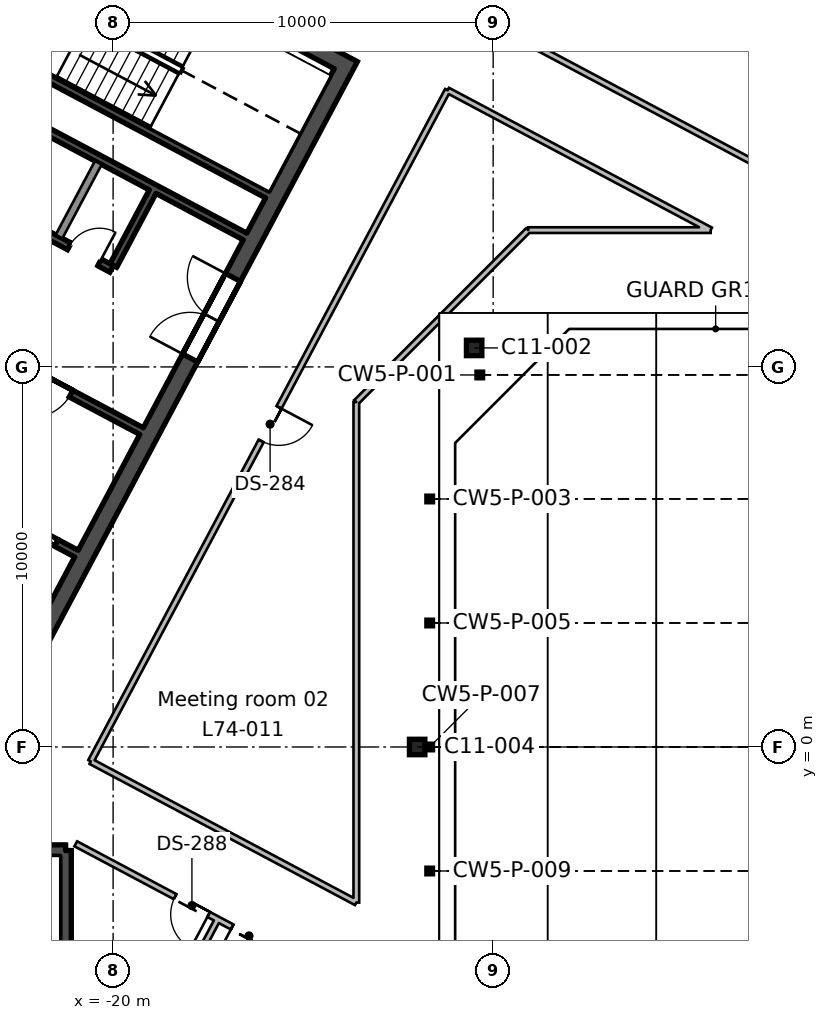
"""IFC4 building model, lengths in metres.
Left out: names, types, materials, properties, quantities, classifications, styles, units other than length and angle.
Written with IfcOpenShell. Run it as: python <this file> out.ifc"""

import sys

from ifc_helpers import new_model, si_unit, direction, frame, frame_2d, origin, origin_2d, place, context, subcontext, project, spatial, rectangle, hollow_rectangle, extrude, element, fill, save


model = new_model("IFC4")
c1 = context("Model", 3, precision=1e-05, world=origin(), true_north=direction((0.0, 1.0)))
c2 = subcontext(c1, "Body", "Model", "MODEL_VIEW")
j1 = project(units=[si_unit("LENGTHUNIT", "METRE"), si_unit("PLANEANGLEUNIT", "RADIAN")], contexts=[c1])
p1 = place(None, origin())
s1 = spatial("IfcSite", under=j1, at=p1, CompositionType="ELEMENT")
p2 = place(p1, origin())
s2 = spatial("IfcBuilding", under=s1, at=p2, CompositionType="ELEMENT")
p3 = place(p2, frame((0.0, 0.0, 324.3)))
s3 = spatial("IfcBuildingStorey", under=s2, at=p3, CompositionType="ELEMENT", Elevation=324.3)
for number, where, z_axis, x_axis in (
    (1, (-12.0, 0.0, 0.0), (0.0, 0.0, 1.0), (1.0, 0.0, 0.0)),
    (2, (-10.5, 10.5, 0.0), (0.0, 0.0, 1.0), (1.0, 0.0, 0.0)),
):
    element("IfcColumn", number, at=place(p3, frame(where, z_axis=z_axis, x_axis=x_axis)), inside=s3, PredefinedType="COLUMN", context=c2, shape_type="SweptSolid", body=[
        extrude(hollow_rectangle(XDim=0.406, YDim=0.406, WallThickness=0.009, InnerFilletRadius=0.004, OuterFilletRadius=0.013, at=origin_2d()), origin(), (0.0, 0.0, 1.0), 3.9),
    ])
p4 = place(p3, frame((-13.771, 18.138, 0.0), z_axis=(0.0, 0.0, 1.0), x_axis=(-0.469467968382, -0.882949504028, 0.0)))
e3 = element("IfcWall", 3, at=p4, inside=s3, PredefinedType="SHEAR", context=c2, shape_type="SweptSolid", body=[
    extrude(rectangle(XDim=19.1, YDim=0.45, at=frame_2d((9.55, 0.0))), origin(), (0.0, 0.0, 1.0), 3.9),
])
p5 = place(p4, frame((6.55, 0.0, 0.0)))
e4 = element("IfcOpeningElement", 4, at=p5, cuts=e3, PredefinedType="OPENING", context=c2, shape_type="SweptSolid", body=[
    extrude(rectangle(XDim=2.4, YDim=2.4, at=frame_2d((1.2, 1.2))), frame((0.0, 0.235, 0.0), z_axis=(0.0, -1.0, 0.0), x_axis=(1.0, 0.0, 0.0)), (0.0, 0.0, 1.0), 0.47),
])
p6 = place(p3, frame((-14.076, 18.045, 0.0), z_axis=(0.0, 0.0, 1.0), x_axis=(-0.882947755831, 0.46947125628, 0.0)))
e5 = element("IfcWall", 5, at=p6, inside=s3, PredefinedType="SHEAR", context=c2, shape_type="SweptSolid", body=[
    extrude(rectangle(XDim=20.2, YDim=0.45, at=frame_2d((10.1, 0.0))), origin(), (0.0, 0.0, 1.0), 3.9),
])
p7 = place(p3, frame((-18.96, 14.611, 0.0), z_axis=(0.0, 0.0, 1.0), x_axis=(-0.4694473164, -0.882960484464, 0.0)))
e6 = element("IfcWall", 6, at=p7, inside=s3, PredefinedType="SHEAR", context=c2, shape_type="SweptSolid", body=[
    extrude(rectangle(XDim=2.2, YDim=0.2, at=frame_2d((1.1, 0.0))), origin(), (0.0, 0.0, 1.0), 3.9),
])
p8 = place(p3, frame((-20.39, 15.372, 0.0), z_axis=(0.0, 0.0, 1.0), x_axis=(-0.4694473164, -0.882960484464, 0.0)))
e7 = element("IfcWall", 7, at=p8, inside=s3, PredefinedType="SOLIDWALL", context=c2, shape_type="SweptSolid", body=[
    extrude(rectangle(XDim=2.2, YDim=0.2, at=frame_2d((1.1, 0.0))), origin(), (0.0, 0.0, 1.0), 3.9),
])
p9 = place(p3, frame((-21.333, 21.649, 0.0), z_axis=(0.0, 0.0, 1.0), x_axis=(-0.469494272526, -0.882935517501, 0.0)))
e8 = element("IfcWall", 8, at=p9, inside=s3, PredefinedType="SHEAR", context=c2, shape_type="SweptSolid", body=[
    extrude(rectangle(XDim=7.3, YDim=0.2, at=frame_2d((3.65, 0.0))), origin(), (0.0, 0.0, 1.0), 3.9),
])
p10 = place(p9, frame((1.3, 0.0, 0.0)))
e9 = element("IfcOpeningElement", 9, at=p10, cuts=e8, PredefinedType="OPENING", context=c2, shape_type="SweptSolid", body=[
    extrude(rectangle(XDim=1.2, YDim=2.1, at=frame_2d((0.6, 1.05))), frame((0.0, 0.11, 0.0), z_axis=(0.0, -1.0, 0.0), x_axis=(1.0, 0.0, 0.0)), (0.0, 0.0, 1.0), 0.22),
])
p11 = place(p3, frame((-15.942, 14.536, 0.0), z_axis=(0.0, 0.0, 1.0), x_axis=(-0.882946947542, 0.469472776449, 0.0)))
e10 = element("IfcWall", 10, at=p11, inside=s3, PredefinedType="SHEAR", context=c2, shape_type="SweptSolid", body=[
    extrude(rectangle(XDim=8.0, YDim=0.2, at=frame_2d((4.0, 0.0))), origin(), (0.0, 0.0, 1.0), 3.9),
])
p12 = place(p3, frame((-16.529, 13.432, 0.0), z_axis=(0.0, 0.0, 1.0), x_axis=(-0.88295287151, 0.469461634952, 0.0)))
e11 = element("IfcWall", 11, at=p12, inside=s3, PredefinedType="SHEAR", context=c2, shape_type="SweptSolid", body=[
    extrude(rectangle(XDim=8.0, YDim=0.2, at=frame_2d((4.0, 0.0))), origin(), (0.0, 0.0, 1.0), 3.9),
])
p13 = place(p3, frame((-20.04, 12.581, 0.0), z_axis=(0.0, 0.0, 1.0), x_axis=(-0.882942972946, 0.469480251476, 0.0)))
e12 = element("IfcWall", 12, at=p13, inside=s3, PredefinedType="SHEAR", context=c2, shape_type="SweptSolid", body=[
    extrude(rectangle(XDim=5.4, YDim=0.2, at=frame_2d((2.7, 0.0))), origin(), (0.0, 0.0, 1.0), 3.9),
])
p14 = place(p13, frame((0.36, 0.0, 0.0)))
e13 = element("IfcOpeningElement", 13, at=p14, cuts=e12, PredefinedType="OPENING", context=c2, shape_type="SweptSolid", body=[
    extrude(rectangle(XDim=0.9, YDim=2.1, at=frame_2d((0.45, 1.05))), frame((0.0, 0.11, 0.0), z_axis=(0.0, -1.0, 0.0), x_axis=(1.0, 0.0, 0.0)), (0.0, 0.0, 1.0), 0.22),
])
p15 = place(p13, frame((3.06, 0.0, 0.0)))
e14 = element("IfcOpeningElement", 14, at=p15, cuts=e12, PredefinedType="OPENING", context=c2, shape_type="SweptSolid", body=[
    extrude(rectangle(XDim=0.9, YDim=2.1, at=frame_2d((0.45, 1.05))), frame((0.0, 0.11, 0.0), z_axis=(0.0, -1.0, 0.0), x_axis=(1.0, 0.0, 0.0)), (0.0, 0.0, 1.0), 0.22),
])
p16 = place(p3, frame((-19.252, 8.311, 0.0), z_axis=(0.0, 0.0, 1.0), x_axis=(-0.882955722218, 0.469456273365, 0.0)))
e15 = element("IfcWall", 15, at=p16, inside=s3, PredefinedType="SHEAR", context=c2, shape_type="SweptSolid", body=[
    extrude(rectangle(XDim=10.0, YDim=0.2, at=frame_2d((5.0, 0.0))), origin(), (0.0, 0.0, 1.0), 3.9),
])
p17 = place(p16, frame((2.1, 0.0, 0.0)))
e16 = element("IfcOpeningElement", 16, at=p17, cuts=e15, PredefinedType="OPENING", context=c2, shape_type="SweptSolid", body=[
    extrude(rectangle(XDim=1.2, YDim=2.1, at=frame_2d((0.6, 1.05))), frame((0.0, 0.11, 0.0), z_axis=(0.0, -1.0, 0.0), x_axis=(1.0, 0.0, 0.0)), (0.0, 0.0, 1.0), 0.22),
])
p18 = place(p16, frame((5.4, 0.0, 0.0)))
e17 = element("IfcOpeningElement", 17, at=p18, cuts=e15, PredefinedType="OPENING", context=c2, shape_type="SweptSolid", body=[
    extrude(rectangle(XDim=1.1, YDim=2.1, at=frame_2d((0.55, 1.05))), frame((0.0, 0.11, 0.0), z_axis=(0.0, -1.0, 0.0), x_axis=(1.0, 0.0, 0.0)), (0.0, 0.0, 1.0), 0.22),
])
p19 = place(p16, frame((8.1, 0.0, 0.0)))
e18 = element("IfcOpeningElement", 18, at=p19, cuts=e15, PredefinedType="OPENING", context=c2, shape_type="SweptSolid", body=[
    extrude(rectangle(XDim=1.1, YDim=2.1, at=frame_2d((0.55, 1.05))), frame((0.0, 0.11, 0.0), z_axis=(0.0, -1.0, 0.0), x_axis=(1.0, 0.0, 0.0)), (0.0, 0.0, 1.0), 0.22),
])
p20 = place(p3, frame((-20.965, 5.088, 0.0), z_axis=(0.0, 0.0, 1.0), x_axis=(-0.882925986334, 0.469512196493, 0.0)))
e19 = element("IfcWall", 19, at=p20, inside=s3, PredefinedType="SHEAR", context=c2, shape_type="SweptSolid", body=[
    extrude(rectangle(XDim=4.5, YDim=0.2, at=frame_2d((2.25, 0.0))), origin(), (0.0, 0.0, 1.0), 3.9),
])
p21 = place(p20, frame((0.6, 0.0, 0.0)))
e20 = element("IfcOpeningElement", 20, at=p21, cuts=e19, PredefinedType="OPENING", context=c2, shape_type="SweptSolid", body=[
    extrude(rectangle(XDim=1.1, YDim=2.1, at=frame_2d((0.55, 1.05))), frame((0.0, 0.11, 0.0), z_axis=(0.0, -1.0, 0.0), x_axis=(1.0, 0.0, 0.0)), (0.0, 0.0, 1.0), 0.22),
])
p22 = place(p3, frame((-21.25, -2.725, 0.0), z_axis=(0.0, 0.0, 1.0), x_axis=(0.0, -1.0, 0.0)))
e21 = element("IfcWall", 21, at=p22, inside=s3, PredefinedType="SHEAR", context=c2, shape_type="SweptSolid", body=[
    extrude(rectangle(XDim=3.75, YDim=0.3, at=frame_2d((1.875, 0.0))), origin(), (0.0, 0.0, 1.0), 3.9),
])
p23 = place(p3, frame((-29.55, -2.725, 0.0), z_axis=(0.0, 0.0, 1.0), x_axis=(1.0, 0.0, 0.0)))
e22 = element("IfcWall", 22, at=p23, inside=s3, PredefinedType="SHEAR", context=c2, shape_type="SweptSolid", body=[
    extrude(rectangle(XDim=8.3, YDim=0.3, at=frame_2d((4.15, 0.0))), origin(), (0.0, 0.0, 1.0), 3.9),
])
p24 = place(p23, frame((0.375, 0.0, 0.0)))
e23 = element("IfcOpeningElement", 23, at=p24, cuts=e22, PredefinedType="OPENING", context=c2, shape_type="SweptSolid", body=[
    extrude(rectangle(XDim=1.2, YDim=2.1, at=frame_2d((0.6, 1.05))), frame((0.0, 0.16, 0.0), z_axis=(0.0, -1.0, 0.0), x_axis=(1.0, 0.0, 0.0)), (0.0, 0.0, 1.0), 0.32),
])
p25 = place(p3, frame((-3.865, -8.31, 3.9), z_axis=(0.0, 0.0, 1.0), x_axis=(0.595701892523, 0.80320561206, 0.0)))
e24 = element("IfcWall", 24, at=p25, inside=s3, PredefinedType="STANDARD", context=c2, shape_type="SweptSolid", body=[
    extrude(rectangle(XDim=4.553, YDim=0.2, at=frame_2d((2.277, 0.0))), origin(), (0.0, 0.0, 1.0), 1.1),
])
for number, where, z_axis, x_axis in (
    (25, (-11.67, -3.263, 3.9), (0.0, 0.0, 1.0), (1.0, 0.0, 0.0)),
    (26, (-11.67, 0.0, 3.9), (0.0, 0.0, 1.0), (1.0, 0.0, 0.0)),
    (27, (-11.67, 3.263, 3.9), (0.0, 0.0, 1.0), (1.0, 0.0, 0.0)),
    (28, (-11.67, 6.526, 3.9), (0.0, 0.0, 1.0), (1.0, 0.0, 0.0)),
    (29, (-10.351, 9.789, 3.9), (0.0, 0.0, 1.0), (1.0, 0.0, 0.0)),
):
    element("IfcColumn", number, at=place(p3, frame(where, z_axis=z_axis, x_axis=x_axis)), inside=s3, PredefinedType="COLUMN", context=c2, shape_type="SweptSolid", body=[
        extrude(hollow_rectangle(XDim=0.15, YDim=0.15, WallThickness=0.008, InnerFilletRadius=0.004, OuterFilletRadius=0.012, at=origin_2d()), origin(), (0.0, 0.0, 1.0), 2.45),
    ])
p26 = place(p3, frame((-48.947, 39.73, 0.0), z_axis=(0.0, 0.0, 1.0), x_axis=(0.882945454821, -0.469475583828, 0.0)))
e30 = element("IfcWall", 30, at=p26, inside=s3, PredefinedType="PARTITIONING", context=c2, shape_type="SweptSolid", body=[
    extrude(rectangle(XDim=55.436, YDim=0.15, at=frame_2d((27.718, 0.0))), origin(), (0.0, 0.0, 1.0), 3.5),
])
p27 = place(p26, frame((28.35, 0.0, 0.0)))
e31 = element("IfcOpeningElement", 31, at=p27, cuts=e30, PredefinedType="OPENING", context=c2, shape_type="SweptSolid", body=[
    extrude(rectangle(XDim=1.8, YDim=2.1, at=frame_2d((0.9, 1.05))), frame((0.0, 0.085, 0.0), z_axis=(0.0, -1.0, 0.0), x_axis=(1.0, 0.0, 0.0)), (0.0, 0.0, 1.0), 0.17),
])
p28 = place(p26, frame((26.7, 0.0, 0.0)))
e32 = element("IfcOpeningElement", 32, at=p28, cuts=e30, PredefinedType="OPENING", context=c2, shape_type="SweptSolid", body=[
    extrude(rectangle(XDim=1.0, YDim=2.1, at=frame_2d((0.5, 1.05))), frame((0.0, 0.085, 0.0), z_axis=(0.0, -1.0, 0.0), x_axis=(1.0, 0.0, 0.0)), (0.0, 0.0, 1.0), 0.17),
])
p29 = place(p26, frame((15.65, 0.0, 0.0)))
e33 = element("IfcOpeningElement", 33, at=p29, cuts=e30, PredefinedType="OPENING", context=c2, shape_type="SweptSolid", body=[
    extrude(rectangle(XDim=1.0, YDim=2.1, at=frame_2d((0.5, 1.05))), frame((0.0, 0.085, 0.0), z_axis=(0.0, -1.0, 0.0), x_axis=(1.0, 0.0, 0.0)), (0.0, 0.0, 1.0), 0.17),
])
p30 = place(p3, frame((-17.248, -4.533, 0.0), z_axis=(0.0, 0.0, 1.0), x_axis=(-0.46943766298, -0.882965616871, 0.0)))
e34 = element("IfcWall", 34, at=p30, inside=s3, PredefinedType="PARTITIONING", context=c2, shape_type="SweptSolid", body=[
    extrude(rectangle(XDim=9.1, YDim=0.15, at=frame_2d((4.55, 0.0))), origin(), (0.0, 0.0, 1.0), 3.5),
])
p31 = place(p3, frame((-13.6, -6.473, 0.0), z_axis=(0.0, 0.0, 1.0), x_axis=(-0.882934197132, 0.469496755618, 0.0)))
e35 = element("IfcWall", 35, at=p31, inside=s3, PredefinedType="PARTITIONING", context=c2, shape_type="SweptSolid", body=[
    extrude(rectangle(XDim=8.362, YDim=0.15, at=frame_2d((4.181, 0.0))), origin(), (0.0, 0.0, 1.0), 3.5),
])
p32 = place(p31, frame((4.4, 0.0, 0.0)))
e36 = element("IfcOpeningElement", 36, at=p32, cuts=e35, PredefinedType="OPENING", context=c2, shape_type="SweptSolid", body=[
    extrude(rectangle(XDim=1.0, YDim=2.1, at=frame_2d((0.5, 1.05))), frame((0.0, 0.085, 0.0), z_axis=(0.0, -1.0, 0.0), x_axis=(1.0, 0.0, 0.0)), (0.0, 0.0, 1.0), 0.17),
])
p33 = place(p31, frame((2.699, 0.0, 0.0)))
e37 = element("IfcOpeningElement", 37, at=p33, cuts=e35, PredefinedType="OPENING", context=c2, shape_type="SweptSolid", body=[
    extrude(rectangle(XDim=1.0, YDim=2.1, at=frame_2d((0.5, 1.05))), frame((0.0, 0.085, 0.0), z_axis=(0.0, -1.0, 0.0), x_axis=(1.0, 0.0, 0.0)), (0.0, 0.0, 1.0), 0.17),
])
p34 = place(p3, frame((-20.588, -0.379, 0.0), z_axis=(0.0, 0.0, 1.0), x_axis=(0.469489882812, 0.882937851685, 0.0)))
e38 = element("IfcWall", 38, at=p34, inside=s3, PredefinedType="PARTITIONING", context=c2, shape_type="SweptSolid", body=[
    extrude(rectangle(XDim=20.0, YDim=0.15, at=frame_2d((10.0, 0.0))), origin(), (0.0, 0.0, 1.0), 3.5),
])
p35 = place(p34, frame((9.55, 0.0, 0.0)))
e39 = element("IfcOpeningElement", 39, at=p35, cuts=e38, PredefinedType="OPENING", context=c2, shape_type="SweptSolid", body=[
    extrude(rectangle(XDim=1.0, YDim=2.1, at=frame_2d((0.5, 1.05))), frame((0.0, 0.085, 0.0), z_axis=(0.0, -1.0, 0.0), x_axis=(1.0, 0.0, 0.0)), (0.0, 0.0, 1.0), 0.17),
])
p36 = place(p3, frame((-11.198, 17.28, 0.0), z_axis=(0.0, 0.0, 1.0), x_axis=(0.882946288452, -0.46947401601, 0.0)))
e40 = element("IfcWall", 40, at=p36, inside=s3, PredefinedType="PARTITIONING", context=c2, shape_type="SweptSolid", body=[
    extrude(rectangle(XDim=7.838, YDim=0.15, at=frame_2d((3.919, 0.0))), origin(), (0.0, 0.0, 1.0), 3.5),
])
p37 = place(p3, frame((-4.277, 13.6, 0.0), z_axis=(0.0, 0.0, 1.0), x_axis=(-1.0, 0.0, 0.0)))
e41 = element("IfcWall", 41, at=p37, inside=s3, PredefinedType="PARTITIONING", context=c2, shape_type="SweptSolid", body=[
    extrude(rectangle(XDim=4.8, YDim=0.15, at=frame_2d((2.4, 0.0))), origin(), (0.0, 0.0, 1.0), 3.5),
])
p38 = place(p3, frame((-9.077, 13.6, 0.0), z_axis=(0.0, 0.0, 1.0), x_axis=(-0.707106781187, -0.707106781187, 0.0)))
e42 = element("IfcWall", 42, at=p38, inside=s3, PredefinedType="PARTITIONING", context=c2, shape_type="SweptSolid", body=[
    extrude(rectangle(XDim=6.397, YDim=0.15, at=frame_2d((3.198, 0.0))), origin(), (0.0, 0.0, 1.0), 3.5),
])
p39 = place(p3, frame((-13.6, 9.077, 0.0), z_axis=(0.0, 0.0, 1.0), x_axis=(0.0, -1.0, 0.0)))
e43 = element("IfcWall", 43, at=p39, inside=s3, PredefinedType="PARTITIONING", context=c2, shape_type="SweptSolid", body=[
    extrude(rectangle(XDim=13.171, YDim=0.15, at=frame_2d((6.585, 0.0))), origin(), (0.0, 0.0, 1.0), 3.5),
])
p40 = place(p3, frame((-13.6, -4.094, 0.0), z_axis=(0.0, 0.0, 1.0), x_axis=(-0.882967890474, 0.469433386533, 0.0)))
e44 = element("IfcWall", 44, at=p40, inside=s3, PredefinedType="PARTITIONING", context=c2, shape_type="SweptSolid", body=[
    extrude(rectangle(XDim=7.914, YDim=0.15, at=frame_2d((3.957, 0.0))), origin(), (0.0, 0.0, 1.0), 3.5),
])
p41 = place(p5, frame((2.4, 0.0, 0.0), z_axis=(0.0, 0.0, 1.0), x_axis=(-1.0, 0.0, 0.0)))
e45 = element("IfcDoor", 45, at=p41, inside=s3, OperationType="DOUBLE_DOOR_SINGLE_SWING", PredefinedType="DOOR", context=c2, shape_type="SweptSolid", body=[
    extrude(rectangle(XDim=2.4, YDim=2.4, at=frame_2d((1.2, 1.2))), frame((0.0, 0.025, 0.0), z_axis=(0.0, -1.0, 0.0), x_axis=(1.0, 0.0, 0.0)), (0.0, 0.0, 1.0), 0.05),
])
fill(e4, e45)
p42 = place(p17, origin())
e46 = element("IfcDoor", 46, at=p42, inside=s3, OperationType="SINGLE_SWING_RIGHT", PredefinedType="DOOR", context=c2, shape_type="SweptSolid", body=[
    extrude(rectangle(XDim=1.2, YDim=2.1, at=frame_2d((0.6, 1.05))), frame((0.0, 0.025, 0.0), z_axis=(0.0, -1.0, 0.0), x_axis=(1.0, 0.0, 0.0)), (0.0, 0.0, 1.0), 0.05),
])
fill(e16, e46)
p43 = place(p14, frame((0.9, 0.0, 0.0), z_axis=(0.0, 0.0, 1.0), x_axis=(-1.0, 0.0, 0.0)))
e47 = element("IfcDoor", 47, at=p43, inside=s3, OperationType="SINGLE_SWING_RIGHT", PredefinedType="DOOR", context=c2, shape_type="SweptSolid", body=[
    extrude(rectangle(XDim=0.9, YDim=2.1, at=frame_2d((0.45, 1.05))), frame((0.0, 0.025, 0.0), z_axis=(0.0, -1.0, 0.0), x_axis=(1.0, 0.0, 0.0)), (0.0, 0.0, 1.0), 0.05),
])
fill(e13, e47)
p44 = place(p21, origin())
e48 = element("IfcDoor", 48, at=p44, inside=s3, OperationType="DOUBLE_DOOR_SLIDING", PredefinedType="DOOR", context=c2, shape_type="SweptSolid", body=[
    extrude(rectangle(XDim=1.1, YDim=2.1, at=frame_2d((0.55, 1.05))), frame((0.0, 0.025, 0.0), z_axis=(0.0, -1.0, 0.0), x_axis=(1.0, 0.0, 0.0)), (0.0, 0.0, 1.0), 0.05),
])
fill(e20, e48)
p45 = place(p35, frame((1.0, 0.0, 0.0), z_axis=(0.0, 0.0, 1.0), x_axis=(-1.0, 0.0, 0.0)))
e49 = element("IfcDoor", 49, at=p45, inside=s3, OperationType="SINGLE_SWING_LEFT", PredefinedType="DOOR", context=c2, shape_type="SweptSolid", body=[
    extrude(rectangle(XDim=1.0, YDim=2.1, at=frame_2d((0.5, 1.05))), frame((0.0, 0.025, 0.0), z_axis=(0.0, -1.0, 0.0), x_axis=(1.0, 0.0, 0.0)), (0.0, 0.0, 1.0), 0.05),
])
fill(e39, e49)
p46 = place(p32, origin())
e50 = element("IfcDoor", 50, at=p46, inside=s3, OperationType="SINGLE_SWING_LEFT", PredefinedType="DOOR", context=c2, shape_type="SweptSolid", body=[
    extrude(rectangle(XDim=1.0, YDim=2.1, at=frame_2d((0.5, 1.05))), frame((0.0, 0.025, 0.0), z_axis=(0.0, -1.0, 0.0), x_axis=(1.0, 0.0, 0.0)), (0.0, 0.0, 1.0), 0.05),
])
fill(e36, e50)
p47 = place(p33, origin())
e51 = element("IfcDoor", 51, at=p47, inside=s3, OperationType="SINGLE_SWING_RIGHT", PredefinedType="DOOR", context=c2, shape_type="SweptSolid", body=[
    extrude(rectangle(XDim=1.0, YDim=2.1, at=frame_2d((0.5, 1.05))), frame((0.0, 0.025, 0.0), z_axis=(0.0, -1.0, 0.0), x_axis=(1.0, 0.0, 0.0)), (0.0, 0.0, 1.0), 0.05),
])
fill(e37, e51)
save(model, sys.argv[1])
